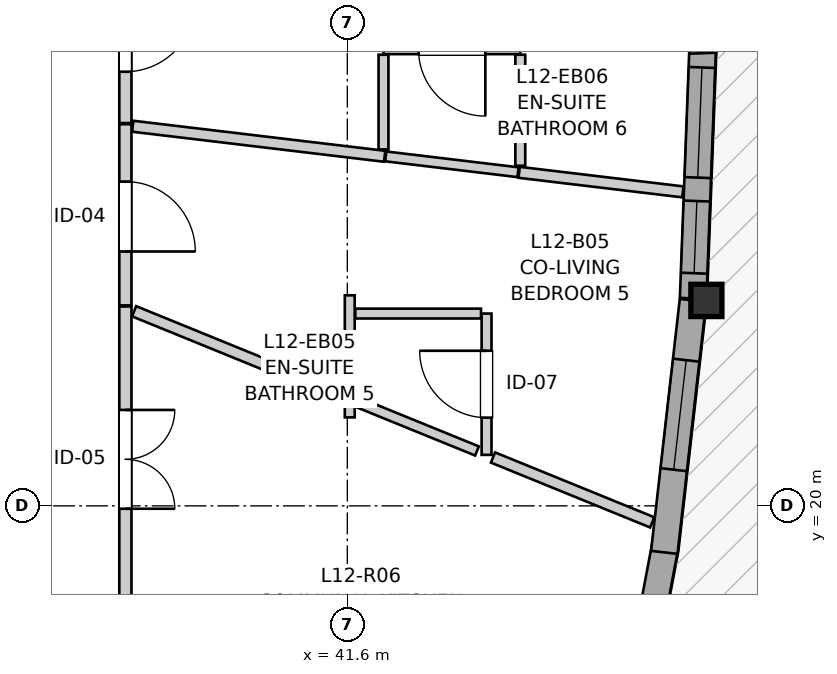
"""IFC4 building model, lengths in metres.
Left out: names, types, materials, properties, quantities, classifications, styles, units other than length and angle.
Written with IfcOpenShell. Run it as: python <this file> out.ifc"""

import sys

from ifc_helpers import new_model, si_unit, direction, frame, frame_2d, origin, origin_2d, place, context, subcontext, project, spatial, rectangle, i_section, extrude, source, transform, mapped, element, fill, save


model = new_model("IFC4")
c1 = context("Model", 3, precision=1e-05, world=origin(), true_north=direction((0.0, 1.0)))
c2 = subcontext(c1, "Body", "Model", "MODEL_VIEW")
j1 = project(units=[si_unit("LENGTHUNIT", "METRE"), si_unit("PLANEANGLEUNIT", "RADIAN")], contexts=[c1])
p1 = place(None, origin())
s1 = spatial("IfcSite", under=j1, at=p1, CompositionType="ELEMENT")
p2 = place(p1, origin())
s2 = spatial("IfcBuilding", under=s1, at=p2, CompositionType="ELEMENT")
p3 = place(p2, frame((0.0, 0.0, 43.0)))
s3 = spatial("IfcBuildingStorey", under=s2, at=p3, CompositionType="ELEMENT", Elevation=43.0)
m1 = source(origin(), c2, "Body", "SweptSolid", [
    extrude(i_section(OverallWidth=0.409, OverallDepth=0.425, WebThickness=0.03, FlangeThickness=0.048, FilletRadius=0.015, at=origin_2d()), origin(), (0.0, 0.0, 1.0), 2.94),
])
p4 = place(p3, frame((46.324, 22.703, 0.0), z_axis=(0.0, 0.0, 1.0), x_axis=(1.0, 0.0, 0.0)))
e1 = element("IfcColumn", 1, at=p4, inside=s3, PredefinedType="PILASTER", context=c2, shape_type="MappedRepresentation", body=[
    mapped(m1, transform((0.0, 0.0, 0.0), x_axis=(1.0, 0.0, 0.0), y_axis=(0.0, 1.0, 0.0), z_axis=(0.0, 0.0, 1.0), scale=1.0)),
])
p5 = place(p3, frame((45.206, 16.437, 0.0), z_axis=(0.0, 0.0, 1.0), x_axis=(0.186622565297, 0.982431686237, 0.0)))
e2 = element("IfcWall", 2, at=p5, inside=s3, PredefinedType="SOLIDWALL", context=c2, shape_type="SweptSolid", body=[
    extrude(rectangle(XDim=3.094, YDim=0.35, at=frame_2d((1.547, 0.0))), origin(), (0.0, 0.0, 1.0), 2.42),
])
p6 = place(p5, frame((1.047, 0.0, 0.0)))
e3 = element("IfcOpeningElement", 3, at=p6, cuts=e2, PredefinedType="OPENING", context=c2, shape_type="SweptSolid", body=[
    extrude(rectangle(XDim=1.0, YDim=2.1, at=frame_2d((0.5, 1.05))), frame((0.0, 0.185, 0.0), z_axis=(0.0, -1.0, 0.0), x_axis=(1.0, 0.0, 0.0)), (0.0, 0.0, 1.0), 0.37),
])
p7 = place(p3, frame((45.77, 19.388, 0.0), z_axis=(0.0, 0.0, 1.0), x_axis=(0.113282408476, 0.993562829382, 0.0)))
e4 = element("IfcWall", 4, at=p7, inside=s3, PredefinedType="SOLIDWALL", context=c2, shape_type="SweptSolid", body=[
    extrude(rectangle(XDim=3.336, YDim=0.35, at=frame_2d((1.668, 0.0))), origin(), (0.0, 0.0, 1.0), 2.42),
])
p8 = place(p7, frame((1.095, 0.0, 0.82)))
e5 = element("IfcOpeningElement", 5, at=p8, cuts=e4, PredefinedType="OPENING", context=c2, shape_type="SweptSolid", body=[
    extrude(rectangle(XDim=1.45, YDim=1.25, at=frame_2d((0.725, 0.625))), frame((0.0, 0.185, 0.0), z_axis=(0.0, -1.0, 0.0), x_axis=(1.0, 0.0, 0.0)), (0.0, 0.0, 1.0), 0.37),
])
p9 = place(p3, frame((46.15, 22.729, 0.0), z_axis=(0.0, 0.0, 1.0), x_axis=(0.03797244671, 0.999278786571, 0.0)))
e6 = element("IfcWall", 6, at=p9, inside=s3, PredefinedType="SOLIDWALL", context=c2, shape_type="SweptSolid", body=[
    extrude(rectangle(XDim=3.318, YDim=0.35, at=frame_2d((1.659, 0.0))), origin(), (0.0, 0.0, 1.0), 2.42),
])
p10 = place(p9, frame((0.332, 0.0, 0.82)))
e7 = element("IfcOpeningElement", 7, at=p10, cuts=e6, PredefinedType="OPENING", context=c2, shape_type="SweptSolid", body=[
    extrude(rectangle(XDim=0.95, YDim=1.35, at=frame_2d((0.475, 0.675))), frame((0.0, 0.185, 0.0), z_axis=(0.0, -1.0, 0.0), x_axis=(1.0, 0.0, 0.0)), (0.0, 0.0, 1.0), 0.37),
])
p11 = place(p9, frame((1.59, 0.0, 0.82)))
e8 = element("IfcOpeningElement", 8, at=p11, cuts=e6, PredefinedType="OPENING", context=c2, shape_type="SweptSolid", body=[
    extrude(rectangle(XDim=1.45, YDim=1.25, at=frame_2d((0.725, 0.625))), frame((0.0, 0.185, 0.0), z_axis=(0.0, -1.0, 0.0), x_axis=(1.0, 0.0, 0.0)), (0.0, 0.0, 1.0), 0.37),
])
p12 = place(p3, frame((46.276, 25.955, 0.0), z_axis=(0.0, 0.0, 1.0), x_axis=(-0.037939203929, 0.999280049238, 0.0)))
e9 = element("IfcWall", 9, at=p12, inside=s3, PredefinedType="SOLIDWALL", context=c2, shape_type="SweptSolid", body=[
    extrude(rectangle(XDim=3.037, YDim=0.35, at=frame_2d((1.519, 0.0))), origin(), (0.0, 0.0, 1.0), 2.42),
])
p13 = place(p12, frame((0.599, 0.0, 0.82)))
e10 = element("IfcOpeningElement", 10, at=p13, cuts=e9, PredefinedType="OPENING", context=c2, shape_type="SweptSolid", body=[
    extrude(rectangle(XDim=1.45, YDim=1.25, at=frame_2d((0.725, 0.625))), frame((0.0, 0.185, 0.0), z_axis=(0.0, -1.0, 0.0), x_axis=(1.0, 0.0, 0.0)), (0.0, 0.0, 1.0), 0.37),
])
p14 = place(p3, frame((38.68, 22.623, 0.0), z_axis=(0.0, 0.0, 1.0), x_axis=(0.0, -1.0, 0.0)))
e11 = element("IfcWall", 11, at=p14, inside=s3, PredefinedType="PARTITIONING", context=c2, shape_type="SweptSolid", body=[
    extrude(rectangle(XDim=4.026, YDim=0.16, at=frame_2d((2.013, 0.0))), origin(), (0.0, 0.0, 1.0), 2.94),
])
p15 = place(p14, frame((1.361, 0.0, 0.0)))
e12 = element("IfcOpeningElement", 12, at=p15, cuts=e11, PredefinedType="OPENING", context=c2, shape_type="SweptSolid", body=[
    extrude(rectangle(XDim=1.3, YDim=2.1, at=frame_2d((0.65, 1.05))), frame((0.0, 0.09, 0.0), z_axis=(0.0, -1.0, 0.0), x_axis=(1.0, 0.0, 0.0)), (0.0, 0.0, 1.0), 0.18),
])
p16 = place(p3, frame((38.68, 25.021, 0.0), z_axis=(0.0, 0.0, 1.0), x_axis=(0.0, -1.0, 0.0)))
e13 = element("IfcWall", 13, at=p16, inside=s3, PredefinedType="PARTITIONING", context=c2, shape_type="SweptSolid", body=[
    extrude(rectangle(XDim=2.383, YDim=0.16, at=frame_2d((1.191, 0.0))), origin(), (0.0, 0.0, 1.0), 2.94),
])
p17 = place(p16, frame((0.754, 0.0, 0.0)))
e14 = element("IfcOpeningElement", 14, at=p17, cuts=e13, PredefinedType="OPENING", context=c2, shape_type="SweptSolid", body=[
    extrude(rectangle(XDim=0.92, YDim=2.1, at=frame_2d((0.46, 1.05))), frame((0.0, 0.09, 0.0), z_axis=(0.0, -1.0, 0.0), x_axis=(1.0, 0.0, 0.0)), (0.0, 0.0, 1.0), 0.18),
])
p18 = place(p3, frame((38.68, 27.353, 0.0), z_axis=(0.0, 0.0, 1.0), x_axis=(0.0, -1.0, 0.0)))
e15 = element("IfcWall", 15, at=p18, inside=s3, PredefinedType="PARTITIONING", context=c2, shape_type="SweptSolid", body=[
    extrude(rectangle(XDim=2.317, YDim=0.16, at=frame_2d((1.159, 0.0))), origin(), (0.0, 0.0, 1.0), 2.94),
])
p19 = place(p18, frame((0.721, 0.0, 0.0)))
e16 = element("IfcOpeningElement", 16, at=p19, cuts=e15, PredefinedType="OPENING", context=c2, shape_type="SweptSolid", body=[
    extrude(rectangle(XDim=0.92, YDim=2.1, at=frame_2d((0.46, 1.05))), frame((0.0, 0.09, 0.0), z_axis=(0.0, -1.0, 0.0), x_axis=(1.0, 0.0, 0.0)), (0.0, 0.0, 1.0), 0.18),
])
p20 = place(p3, frame((43.432, 20.671, 0.0), z_axis=(0.0, 0.0, 1.0), x_axis=(0.0, 1.0, 0.0)))
e17 = element("IfcWall", 17, at=p20, inside=s3, PredefinedType="PARTITIONING", context=c2, shape_type="SweptSolid", body=[
    extrude(rectangle(XDim=1.859, YDim=0.13, at=frame_2d((0.93, 0.0))), origin(), (0.0, 0.0, 1.0), 2.94),
])
p21 = place(p20, frame((0.49, 0.0, 0.0)))
e18 = element("IfcOpeningElement", 18, at=p21, cuts=e17, PredefinedType="OPENING", context=c2, shape_type="SweptSolid", body=[
    extrude(rectangle(XDim=0.88, YDim=2.05, at=frame_2d((0.44, 1.025))), frame((0.0, 0.075, 0.0), z_axis=(0.0, -1.0, 0.0), x_axis=(1.0, 0.0, 0.0)), (0.0, 0.0, 1.0), 0.15),
])
p22 = place(p3, frame((43.876, 26.008, 0.0), z_axis=(0.0, 0.0, 1.0), x_axis=(-1.0, 0.0, 0.0)))
e19 = element("IfcWall", 19, at=p22, inside=s3, PredefinedType="PARTITIONING", context=c2, shape_type="SweptSolid", body=[
    extrude(rectangle(XDim=1.8, YDim=0.13, at=frame_2d((0.9, 0.0))), origin(), (0.0, 0.0, 1.0), 2.94),
])
p23 = place(p22, frame((0.46, 0.0, 0.0)))
e20 = element("IfcOpeningElement", 20, at=p23, cuts=e19, PredefinedType="OPENING", context=c2, shape_type="SweptSolid", body=[
    extrude(rectangle(XDim=0.88, YDim=2.05, at=frame_2d((0.44, 1.025))), frame((0.0, 0.075, 0.0), z_axis=(0.0, -1.0, 0.0), x_axis=(1.0, 0.0, 0.0)), (0.0, 0.0, 1.0), 0.15),
])
p24 = place(p3, frame((38.777, 24.994, 0.0), z_axis=(0.0, 0.0, 1.0), x_axis=(0.992964132073, -0.1184155075, 0.0)))
e21 = element("IfcWall", 21, at=p24, inside=s3, PredefinedType="PARTITIONING", context=c2, shape_type="SweptSolid", body=[
    extrude(rectangle(XDim=3.338, YDim=0.145, at=frame_2d((1.669, 0.0))), origin(), (0.0, 0.0, 1.0), 2.94),
])
p25 = place(p3, frame((38.795, 22.56, 0.0), z_axis=(0.0, 0.0, 1.0), x_axis=(0.926055147025, -0.377388214799, 0.0)))
e22 = element("IfcWall", 22, at=p25, inside=s3, PredefinedType="PARTITIONING", context=c2, shape_type="SweptSolid", body=[
    extrude(rectangle(XDim=2.972, YDim=0.145, at=frame_2d((1.486, 0.0))), origin(), (0.0, 0.0, 1.0), 2.94),
])
p26 = place(p3, frame((43.517, 20.636, 0.0), z_axis=(0.0, 0.0, 1.0), x_axis=(0.926053250015, -0.377392869747, 0.0)))
e23 = element("IfcWall", 23, at=p26, inside=s3, PredefinedType="PARTITIONING", context=c2, shape_type="SweptSolid", body=[
    extrude(rectangle(XDim=2.262, YDim=0.145, at=frame_2d((1.131, 0.0))), origin(), (0.0, 0.0, 1.0), 2.94),
])
p27 = place(p3, frame((43.861, 24.388, 0.0), z_axis=(0.0, 0.0, 1.0), x_axis=(0.992948573357, -0.118545901105, 0.0)))
e24 = element("IfcWall", 24, at=p27, inside=s3, PredefinedType="PARTITIONING", context=c2, shape_type="SweptSolid", body=[
    extrude(rectangle(XDim=2.169, YDim=0.145, at=frame_2d((1.084, 0.0))), origin(), (0.0, 0.0, 1.0), 2.94),
])
p28 = place(p3, frame((41.758, 21.353, 0.0), z_axis=(0.0, 0.0, 1.0), x_axis=(0.926203809775, -0.377023212492, 0.0)))
e25 = element("IfcWall", 25, at=p28, inside=s3, PredefinedType="PARTITIONING", context=c2, shape_type="SweptSolid", body=[
    extrude(rectangle(XDim=1.672, YDim=0.13, at=frame_2d((0.836, 0.0))), origin(), (0.0, 0.0, 1.0), 2.94),
])
p29 = place(p3, frame((41.705, 22.53, 0.0), z_axis=(0.0, 0.0, 1.0), x_axis=(1.0, 0.0, 0.0)))
e26 = element("IfcWall", 26, at=p29, inside=s3, PredefinedType="PARTITIONING", context=c2, shape_type="SweptSolid", body=[
    extrude(rectangle(XDim=1.654, YDim=0.13, at=frame_2d((0.827, 0.0))), origin(), (0.0, 0.0, 1.0), 2.94),
])
p30 = place(p3, frame((42.106, 24.598, 0.0), z_axis=(0.0, 0.0, 1.0), x_axis=(0.992915674768, -0.118821137848, 0.0)))
e27 = element("IfcWall", 27, at=p30, inside=s3, PredefinedType="PARTITIONING", context=c2, shape_type="SweptSolid", body=[
    extrude(rectangle(XDim=1.753, YDim=0.13, at=frame_2d((0.876, 0.0))), origin(), (0.0, 0.0, 1.0), 2.94),
])
p31 = place(p3, frame((43.876, 24.475, 0.0), z_axis=(0.0, 0.0, 1.0), x_axis=(0.0, 1.0, 0.0)))
e28 = element("IfcWall", 28, at=p31, inside=s3, PredefinedType="PARTITIONING", context=c2, shape_type="SweptSolid", body=[
    extrude(rectangle(XDim=1.46, YDim=0.13, at=frame_2d((0.73, 0.0))), origin(), (0.0, 0.0, 1.0), 2.94),
])
p32 = place(p3, frame((42.076, 24.69, 0.0), z_axis=(0.0, 0.0, 1.0), x_axis=(0.0, 1.0, 0.0)))
e29 = element("IfcWall", 29, at=p32, inside=s3, PredefinedType="PARTITIONING", context=c2, shape_type="SweptSolid", body=[
    extrude(rectangle(XDim=1.245, YDim=0.13, at=frame_2d((0.623, 0.0))), origin(), (0.0, 0.0, 1.0), 2.94),
])
p33 = place(p3, frame((41.632, 21.164, 0.0), z_axis=(0.0, 0.0, 1.0), x_axis=(0.0, 1.0, 0.0)))
e30 = element("IfcWall", 30, at=p33, inside=s3, PredefinedType="PARTITIONING", context=c2, shape_type="SweptSolid", body=[
    extrude(rectangle(XDim=1.606, YDim=0.13, at=frame_2d((0.803, 0.0))), origin(), (0.0, 0.0, 1.0), 2.94),
])
m2 = source(origin(), c2, "Body", "SweptSolid", [
    extrude(rectangle(XDim=1.45, YDim=1.25, at=frame_2d((0.725, 0.625))), frame((0.0, 0.03, 0.0), z_axis=(0.0, -1.0, 0.0), x_axis=(1.0, 0.0, 0.0)), (0.0, 0.0, 1.0), 0.06),
])
p34 = place(p8, origin())
e31 = element("IfcWindow", 31, at=p34, inside=s3, PartitioningType="SINGLE_PANEL", PredefinedType="WINDOW", context=c2, shape_type="MappedRepresentation", body=[
    mapped(m2, transform((0.0, 0.0, 0.0), x_axis=(1.0, 0.0, 0.0), y_axis=(0.0, 1.0, 0.0), z_axis=(0.0, 0.0, 1.0), scale=1.0)),
])
fill(e5, e31)
m3 = source(origin(), c2, "Body", "SweptSolid", [
    extrude(rectangle(XDim=0.95, YDim=1.35, at=frame_2d((0.475, 0.675))), frame((0.0, 0.03, 0.0), z_axis=(0.0, -1.0, 0.0), x_axis=(1.0, 0.0, 0.0)), (0.0, 0.0, 1.0), 0.06),
])
p35 = place(p10, origin())
e32 = element("IfcWindow", 32, at=p35, inside=s3, PartitioningType="SINGLE_PANEL", PredefinedType="WINDOW", context=c2, shape_type="MappedRepresentation", body=[
    mapped(m3, transform((0.0, 0.0, 0.0), x_axis=(1.0, 0.0, 0.0), y_axis=(0.0, 1.0, 0.0), z_axis=(0.0, 0.0, 1.0), scale=1.0)),
])
fill(e7, e32)
p36 = place(p11, origin())
e33 = element("IfcWindow", 33, at=p36, inside=s3, PartitioningType="SINGLE_PANEL", PredefinedType="WINDOW", context=c2, shape_type="MappedRepresentation", body=[
    mapped(m2, transform((0.0, 0.0, 0.0), x_axis=(1.0, 0.0, 0.0), y_axis=(0.0, 1.0, 0.0), z_axis=(0.0, 0.0, 1.0), scale=1.0)),
])
fill(e8, e33)
m4 = source(origin(), c2, "Body", "SweptSolid", [
    extrude(rectangle(XDim=1.3, YDim=2.1, at=frame_2d((0.65, 1.05))), frame((0.0, 0.025, 0.0), z_axis=(0.0, -1.0, 0.0), x_axis=(1.0, 0.0, 0.0)), (0.0, 0.0, 1.0), 0.05),
])
p37 = place(p15, origin())
e34 = element("IfcDoor", 34, at=p37, inside=s3, OperationType="DOUBLE_DOOR_SINGLE_SWING", PredefinedType="DOOR", context=c2, shape_type="MappedRepresentation", body=[
    mapped(m4, transform((0.0, 0.0, 0.0), x_axis=(1.0, 0.0, 0.0), y_axis=(0.0, 1.0, 0.0), z_axis=(0.0, 0.0, 1.0), scale=1.0)),
])
fill(e12, e34)
m5 = source(origin(), c2, "Body", "SweptSolid", [
    extrude(rectangle(XDim=0.92, YDim=2.1, at=frame_2d((0.46, 1.05))), frame((0.0, 0.025, 0.0), z_axis=(0.0, -1.0, 0.0), x_axis=(1.0, 0.0, 0.0)), (0.0, 0.0, 1.0), 0.05),
])
p38 = place(p17, origin())
e35 = element("IfcDoor", 35, at=p38, inside=s3, OperationType="SINGLE_SWING_RIGHT", PredefinedType="DOOR", context=c2, shape_type="MappedRepresentation", body=[
    mapped(m5, transform((0.0, 0.0, 0.0), x_axis=(1.0, 0.0, 0.0), y_axis=(0.0, 1.0, 0.0), z_axis=(0.0, 0.0, 1.0), scale=1.0)),
])
fill(e14, e35)
p39 = place(p19, origin())
e36 = element("IfcDoor", 36, at=p39, inside=s3, OperationType="SINGLE_SWING_LEFT", PredefinedType="DOOR", context=c2, shape_type="MappedRepresentation", body=[
    mapped(m5, transform((0.0, 0.0, 0.0), x_axis=(1.0, 0.0, 0.0), y_axis=(0.0, 1.0, 0.0), z_axis=(0.0, 0.0, 1.0), scale=1.0)),
])
fill(e16, e36)
m6 = source(origin(), c2, "Body", "SweptSolid", [
    extrude(rectangle(XDim=0.88, YDim=2.05, at=frame_2d((0.44, 1.025))), frame((0.0, 0.025, 0.0), z_axis=(0.0, -1.0, 0.0), x_axis=(1.0, 0.0, 0.0)), (0.0, 0.0, 1.0), 0.05),
])
p40 = place(p21, origin())
e37 = element("IfcDoor", 37, at=p40, inside=s3, OperationType="SINGLE_SWING_RIGHT", PredefinedType="DOOR", context=c2, shape_type="MappedRepresentation", body=[
    mapped(m6, transform((0.0, 0.0, 0.0), x_axis=(1.0, 0.0, 0.0), y_axis=(0.0, 1.0, 0.0), z_axis=(0.0, 0.0, 1.0), scale=1.0)),
])
fill(e18, e37)
save(model, sys.argv[1])
